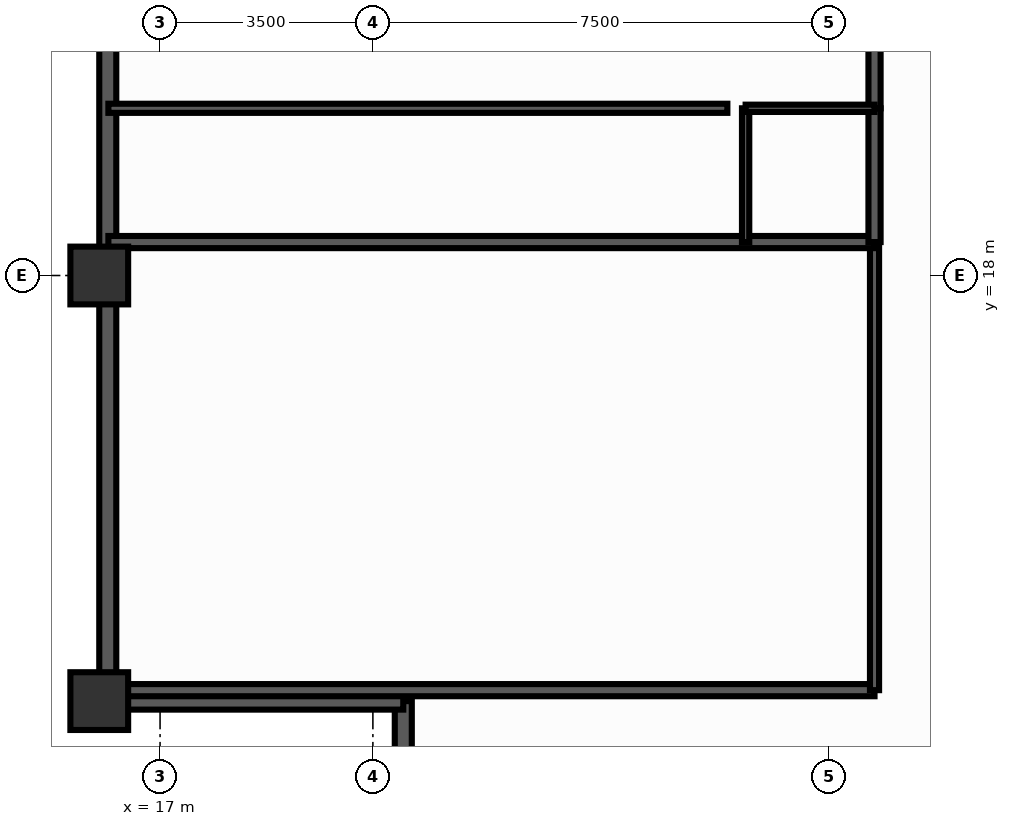
"""IFC4 building model, lengths in metres.
Left out: names, types, materials, properties, quantities, classifications, styles, units other than length and angle.
Written with IfcOpenShell. Run it as: python <this file> out.ifc"""

import sys

from ifc_helpers import new_model, si_unit, direction, frame, frame_2d, origin, origin_2d, place, context, subcontext, project, spatial, rectangle, extrude, source, transform, mapped, element, fill, save


model = new_model("IFC4")
c1 = context("Model", 3, precision=1e-05, world=origin(), true_north=direction((0.0, 1.0)))
c2 = subcontext(c1, "Body", "Model", "MODEL_VIEW")
j1 = project(units=[si_unit("LENGTHUNIT", "METRE"), si_unit("PLANEANGLEUNIT", "RADIAN")], contexts=[c1])
p1 = place(None, origin())
s1 = spatial("IfcSite", under=j1, at=p1, CompositionType="ELEMENT")
p2 = place(p1, origin())
s2 = spatial("IfcBuilding", under=s1, at=p2, CompositionType="ELEMENT")
p3 = place(p2, frame((0.0, 0.0, 148.7)))
s3 = spatial("IfcBuildingStorey", under=s2, at=p3, CompositionType="ELEMENT", Elevation=148.7)
m1 = source(origin(), c2, "Body", "SweptSolid", [
    extrude(rectangle(XDim=0.95, YDim=0.95, at=origin_2d()), origin(), (0.0, 0.0, 1.0), 3.5),
])
for number, where, z_axis, x_axis in (
    (1, (16.0, 18.0, 0.0), (0.0, 0.0, 1.0), (1.0, 0.0, 0.0)),
    (2, (16.0, 11.0, 0.0), (0.0, 0.0, 1.0), (1.0, 0.0, 0.0)),
):
    element("IfcColumn", number, at=place(p3, frame(where, z_axis=z_axis, x_axis=x_axis)), inside=s3, PredefinedType="COLUMN", context=c2, shape_type="MappedRepresentation", body=[
        mapped(m1, transform((0.0, 0.0, 0.0), scale=1.0)),
    ])
p4 = place(p3, frame((16.14, 11.0, 0.0), z_axis=(0.0, 0.0, 1.0), x_axis=(0.0, 1.0, 0.0)))
e3 = element("IfcWall", 3, at=p4, inside=s3, PredefinedType="SOLIDWALL", context=c2, shape_type="SweptSolid", body=[
    extrude(rectangle(XDim=32.0, YDim=0.28, at=frame_2d((16.0, 0.0))), origin(), (0.0, 0.0, 1.0), 2.39),
])
p5 = place(p4, frame((2.9, 0.0, 0.25)))
e4 = element("IfcOpeningElement", 4, at=p5, cuts=e3, PredefinedType="OPENING", context=c2, shape_type="SweptSolid", body=[
    extrude(rectangle(XDim=1.2, YDim=1.5, at=frame_2d((0.6, 0.75))), frame((0.0, 0.152, 0.0), z_axis=(0.0, -1.0, 0.0), x_axis=(1.0, 0.0, 0.0)), (0.0, 0.0, 1.0), 0.304),
])
p6 = place(p4, frame((8.05, 0.0, 0.25)))
e5 = element("IfcOpeningElement", 5, at=p6, cuts=e3, PredefinedType="OPENING", context=c2, shape_type="SweptSolid", body=[
    extrude(rectangle(XDim=1.2, YDim=1.5, at=frame_2d((0.6, 0.75))), frame((0.0, 0.152, 0.0), z_axis=(0.0, -1.0, 0.0), x_axis=(1.0, 0.0, 0.0)), (0.0, 0.0, 1.0), 0.304),
])
p7 = place(p4, frame((10.335, 0.0, 0.25)))
e6 = element("IfcOpeningElement", 6, at=p7, cuts=e3, PredefinedType="OPENING", context=c2, shape_type="SweptSolid", body=[
    extrude(rectangle(XDim=1.2, YDim=1.5, at=frame_2d((0.6, 0.75))), frame((0.0, 0.152, 0.0), z_axis=(0.0, -1.0, 0.0), x_axis=(1.0, 0.0, 0.0)), (0.0, 0.0, 1.0), 0.304),
])
p8 = place(p4, frame((12.92, 0.0, 0.25)))
e7 = element("IfcOpeningElement", 7, at=p8, cuts=e3, PredefinedType="OPENING", context=c2, shape_type="SweptSolid", body=[
    extrude(rectangle(XDim=1.2, YDim=1.5, at=frame_2d((0.6, 0.75))), frame((0.0, 0.152, 0.0), z_axis=(0.0, -1.0, 0.0), x_axis=(1.0, 0.0, 0.0)), (0.0, 0.0, 1.0), 0.304),
])
p9 = place(p4, frame((15.4, 0.0, 0.25)))
e8 = element("IfcOpeningElement", 8, at=p9, cuts=e3, PredefinedType="OPENING", context=c2, shape_type="SweptSolid", body=[
    extrude(rectangle(XDim=1.2, YDim=1.5, at=frame_2d((0.6, 0.75))), frame((0.0, 0.152, 0.0), z_axis=(0.0, -1.0, 0.0), x_axis=(1.0, 0.0, 0.0)), (0.0, 0.0, 1.0), 0.304),
])
p10 = place(p4, frame((17.58, 0.0, 0.25)))
e9 = element("IfcOpeningElement", 9, at=p10, cuts=e3, PredefinedType="OPENING", context=c2, shape_type="SweptSolid", body=[
    extrude(rectangle(XDim=1.2, YDim=1.5, at=frame_2d((0.6, 0.75))), frame((0.0, 0.152, 0.0), z_axis=(0.0, -1.0, 0.0), x_axis=(1.0, 0.0, 0.0)), (0.0, 0.0, 1.0), 0.304),
])
p11 = place(p4, frame((19.865, 0.0, 0.25)))
e10 = element("IfcOpeningElement", 10, at=p11, cuts=e3, PredefinedType="OPENING", context=c2, shape_type="SweptSolid", body=[
    extrude(rectangle(XDim=1.2, YDim=1.5, at=frame_2d((0.6, 0.75))), frame((0.0, 0.152, 0.0), z_axis=(0.0, -1.0, 0.0), x_axis=(1.0, 0.0, 0.0)), (0.0, 0.0, 1.0), 0.304),
])
p12 = place(p4, frame((22.45, 0.0, 0.25)))
e11 = element("IfcOpeningElement", 11, at=p12, cuts=e3, PredefinedType="OPENING", context=c2, shape_type="SweptSolid", body=[
    extrude(rectangle(XDim=1.2, YDim=1.5, at=frame_2d((0.6, 0.75))), frame((0.0, 0.152, 0.0), z_axis=(0.0, -1.0, 0.0), x_axis=(1.0, 0.0, 0.0)), (0.0, 0.0, 1.0), 0.304),
])
p13 = place(p4, frame((27.9, 0.0, 0.25)))
e12 = element("IfcOpeningElement", 12, at=p13, cuts=e3, PredefinedType="OPENING", context=c2, shape_type="SweptSolid", body=[
    extrude(rectangle(XDim=1.2, YDim=1.5, at=frame_2d((0.6, 0.75))), frame((0.0, 0.152, 0.0), z_axis=(0.0, -1.0, 0.0), x_axis=(1.0, 0.0, 0.0)), (0.0, 0.0, 1.0), 0.304),
])
for number, where, z_axis, x_axis in (
    (13, (21.0, 6.08, 0.0), (0.0, 0.0, 1.0), (0.0, 1.0, 0.0)),
    (14, (16.08, 11.0, 0.0), (0.0, 0.0, 1.0), (1.0, 0.0, 0.0)),
):
    element("IfcWall", number, at=place(p3, frame(where, z_axis=z_axis, x_axis=x_axis)), inside=s3, PredefinedType="SOLIDWALL", context=c2, shape_type="SweptSolid", body=[
        extrude(rectangle(XDim=4.92, YDim=0.28, at=frame_2d((2.46, 0.0))), origin(), (0.0, 0.0, 1.0), 2.39),
    ])
p14 = place(p3, frame((28.75, 11.18, 0.0), z_axis=(0.0, 0.0, 1.0), x_axis=(-1.0, 0.0, 0.0)))
e15 = element("IfcWall", 15, at=p14, inside=s3, PredefinedType="PARTITIONING", context=c2, shape_type="SweptSolid", body=[
    extrude(rectangle(XDim=12.6, YDim=0.2, at=frame_2d((6.3, 0.0))), origin(), (0.0, 0.0, 1.0), 3.16),
])
p15 = place(p3, frame((28.75, 11.18, 0.0), z_axis=(0.0, 0.0, 1.0), x_axis=(0.0, 1.0, 0.0)))
e16 = element("IfcWall", 16, at=p15, inside=s3, PredefinedType="PARTITIONING", context=c2, shape_type="SweptSolid", body=[
    extrude(rectangle(XDim=7.37, YDim=0.15, at=frame_2d((3.685, 0.0))), origin(), (0.0, 0.0, 1.0), 3.16),
])
p16 = place(p15, frame((3.135, 0.0, 0.0)))
e17 = element("IfcOpeningElement", 17, at=p16, cuts=e16, PredefinedType="OPENING", context=c2, shape_type="SweptSolid", body=[
    extrude(rectangle(XDim=1.1, YDim=2.15, at=frame_2d((0.55, 1.075))), frame((0.0, 0.087, 0.0), z_axis=(0.0, -1.0, 0.0), x_axis=(1.0, 0.0, 0.0)), (0.0, 0.0, 1.0), 0.174),
])
p17 = place(p3, frame((28.75, 18.55, 0.0), z_axis=(0.0, 0.0, 1.0), x_axis=(-1.0, 0.0, 0.0)))
e18 = element("IfcWall", 18, at=p17, inside=s3, PredefinedType="PARTITIONING", context=c2, shape_type="SweptSolid", body=[
    extrude(rectangle(XDim=12.6, YDim=0.2, at=frame_2d((6.3, 0.0))), origin(), (0.0, 0.0, 1.0), 3.16),
])
p18 = place(p3, frame((28.75, 18.55, 0.0), z_axis=(0.0, 0.0, 1.0), x_axis=(0.0, 1.0, 0.0)))
e19 = element("IfcWall", 19, at=p18, inside=s3, PredefinedType="PARTITIONING", context=c2, shape_type="SweptSolid", body=[
    extrude(rectangle(XDim=2.2, YDim=0.2, at=frame_2d((1.1, 0.0))), origin(), (0.0, 0.0, 1.0), 3.16),
])
p19 = place(p3, frame((28.75, 20.75, 0.0), z_axis=(0.0, 0.0, 1.0), x_axis=(0.0, 1.0, 0.0)))
e20 = element("IfcWall", 20, at=p19, inside=s3, PredefinedType="PARTITIONING", context=c2, shape_type="SweptSolid", body=[
    extrude(rectangle(XDim=2.369, YDim=0.2, at=frame_2d((1.185, 0.0))), origin(), (0.0, 0.0, 1.0), 3.16),
])
p20 = place(p19, frame((0.685, 0.0, 0.0)))
e21 = element("IfcOpeningElement", 21, at=p20, cuts=e20, PredefinedType="OPENING", context=c2, shape_type="SweptSolid", body=[
    extrude(rectangle(XDim=1.0, YDim=2.15, at=frame_2d((0.5, 1.075))), frame((0.0, 0.112, 0.0), z_axis=(0.0, -1.0, 0.0), x_axis=(1.0, 0.0, 0.0)), (0.0, 0.0, 1.0), 0.224),
])
p21 = place(p3, frame((26.63, 18.55, 0.0), z_axis=(0.0, 0.0, 1.0), x_axis=(0.0, 1.0, 0.0)))
e22 = element("IfcWall", 22, at=p21, inside=s3, PredefinedType="PARTITIONING", context=c2, shape_type="SweptSolid", body=[
    extrude(rectangle(XDim=2.2, YDim=0.12, at=frame_2d((1.1, 0.0))), origin(), (0.0, 0.0, 1.0), 3.16),
])
p22 = place(p3, frame((28.75, 20.75, 0.0), z_axis=(0.0, 0.0, 1.0), x_axis=(-1.0, 0.0, 0.0)))
e23 = element("IfcWall", 23, at=p22, inside=s3, PredefinedType="PARTITIONING", context=c2, shape_type="SweptSolid", body=[
    extrude(rectangle(XDim=2.12, YDim=0.12, at=frame_2d((1.06, 0.0))), origin(), (0.0, 0.0, 1.0), 3.16),
])
p23 = place(p22, frame((0.635, 0.0, 0.0)))
e24 = element("IfcOpeningElement", 24, at=p23, cuts=e23, PredefinedType="OPENING", context=c2, shape_type="SweptSolid", body=[
    extrude(rectangle(XDim=0.85, YDim=2.05, at=frame_2d((0.425, 1.025))), frame((0.0, 0.072, 0.0), z_axis=(0.0, -1.0, 0.0), x_axis=(1.0, 0.0, 0.0)), (0.0, 0.0, 1.0), 0.144),
])
p24 = place(p3, frame((26.33, 20.75, 0.0), z_axis=(0.0, 0.0, 1.0), x_axis=(-1.0, 0.0, 0.0)))
e25 = element("IfcWall", 25, at=p24, inside=s3, PredefinedType="PARTITIONING", context=c2, shape_type="SweptSolid", body=[
    extrude(rectangle(XDim=10.18, YDim=0.15, at=frame_2d((5.09, 0.0))), origin(), (0.0, 0.0, 1.0), 3.16),
])
p25 = place(p24, frame((4.273, 0.0, 0.0)))
e26 = element("IfcOpeningElement", 26, at=p25, cuts=e25, PredefinedType="OPENING", context=c2, shape_type="SweptSolid", body=[
    extrude(rectangle(XDim=0.9, YDim=2.1, at=frame_2d((0.45, 1.05))), frame((0.0, 0.087, 0.0), z_axis=(0.0, -1.0, 0.0), x_axis=(1.0, 0.0, 0.0)), (0.0, 0.0, 1.0), 0.174),
])
m2 = source(origin(), c2, "Body", "SweptSolid", [
    extrude(rectangle(XDim=1.2, YDim=1.5, at=frame_2d((0.6, 0.75))), frame((0.0, 0.03, 0.0), z_axis=(0.0, -1.0, 0.0), x_axis=(1.0, 0.0, 0.0)), (0.0, 0.0, 1.0), 0.06),
])
p26 = place(p5, origin())
e27 = element("IfcWindow", 27, at=p26, inside=s3, PartitioningType="SINGLE_PANEL", PredefinedType="WINDOW", context=c2, shape_type="MappedRepresentation", body=[
    mapped(m2, transform((0.0, 0.0, 0.0), scale=1.0)),
])
fill(e4, e27)
p27 = place(p6, origin())
e28 = element("IfcWindow", 28, at=p27, inside=s3, PartitioningType="SINGLE_PANEL", PredefinedType="WINDOW", context=c2, shape_type="MappedRepresentation", body=[
    mapped(m2, transform((0.0, 0.0, 0.0), scale=1.0)),
])
fill(e5, e28)
p28 = place(p7, origin())
e29 = element("IfcWindow", 29, at=p28, inside=s3, PartitioningType="SINGLE_PANEL", PredefinedType="WINDOW", context=c2, shape_type="MappedRepresentation", body=[
    mapped(m2, transform((0.0, 0.0, 0.0), scale=1.0)),
])
fill(e6, e29)
m3 = source(origin(), c2, "Body", "SweptSolid", [
    extrude(rectangle(XDim=1.1, YDim=2.15, at=frame_2d((0.55, 1.075))), frame((0.0, 0.025, 0.0), z_axis=(0.0, -1.0, 0.0), x_axis=(1.0, 0.0, 0.0)), (0.0, 0.0, 1.0), 0.05),
])
p29 = place(p16, origin())
e30 = element("IfcDoor", 30, at=p29, inside=s3, OperationType="SINGLE_SWING_LEFT", PredefinedType="DOOR", context=c2, shape_type="MappedRepresentation", body=[
    mapped(m3, transform((0.0, 0.0, 0.0), scale=1.0)),
])
fill(e17, e30)
m4 = source(origin(), c2, "Body", "SweptSolid", [
    extrude(rectangle(XDim=1.0, YDim=2.15, at=frame_2d((0.5, 1.075))), frame((0.0, 0.025, 0.0), z_axis=(0.0, -1.0, 0.0), x_axis=(1.0, 0.0, 0.0)), (0.0, 0.0, 1.0), 0.05),
])
p30 = place(p20, origin())
e31 = element("IfcDoor", 31, at=p30, inside=s3, OperationType="SINGLE_SWING_RIGHT", PredefinedType="DOOR", context=c2, shape_type="MappedRepresentation", body=[
    mapped(m4, transform((0.0, 0.0, 0.0), scale=1.0)),
])
fill(e21, e31)
m5 = source(origin(), c2, "Body", "SweptSolid", [
    extrude(rectangle(XDim=0.85, YDim=2.05, at=frame_2d((0.425, 1.025))), frame((0.0, 0.025, 0.0), z_axis=(0.0, -1.0, 0.0), x_axis=(1.0, 0.0, 0.0)), (0.0, 0.0, 1.0), 0.05),
])
p31 = place(p23, origin())
e32 = element("IfcDoor", 32, at=p31, inside=s3, OperationType="SINGLE_SWING_LEFT", PredefinedType="DOOR", context=c2, shape_type="MappedRepresentation", body=[
    mapped(m5, transform((0.0, 0.0, 0.0), scale=1.0)),
])
fill(e24, e32)
m6 = source(origin(), c2, "Body", "SweptSolid", [
    extrude(rectangle(XDim=0.9, YDim=2.1, at=frame_2d((0.45, 1.05))), frame((0.0, 0.025, 0.0), z_axis=(0.0, -1.0, 0.0), x_axis=(1.0, 0.0, 0.0)), (0.0, 0.0, 1.0), 0.05),
])
p32 = place(p25, origin())
e33 = element("IfcDoor", 33, at=p32, inside=s3, OperationType="SINGLE_SWING_RIGHT", PredefinedType="DOOR", context=c2, shape_type="MappedRepresentation", body=[
    mapped(m6, transform((0.0, 0.0, 0.0), scale=1.0)),
])
fill(e26, e33)
save(model, sys.argv[1])
